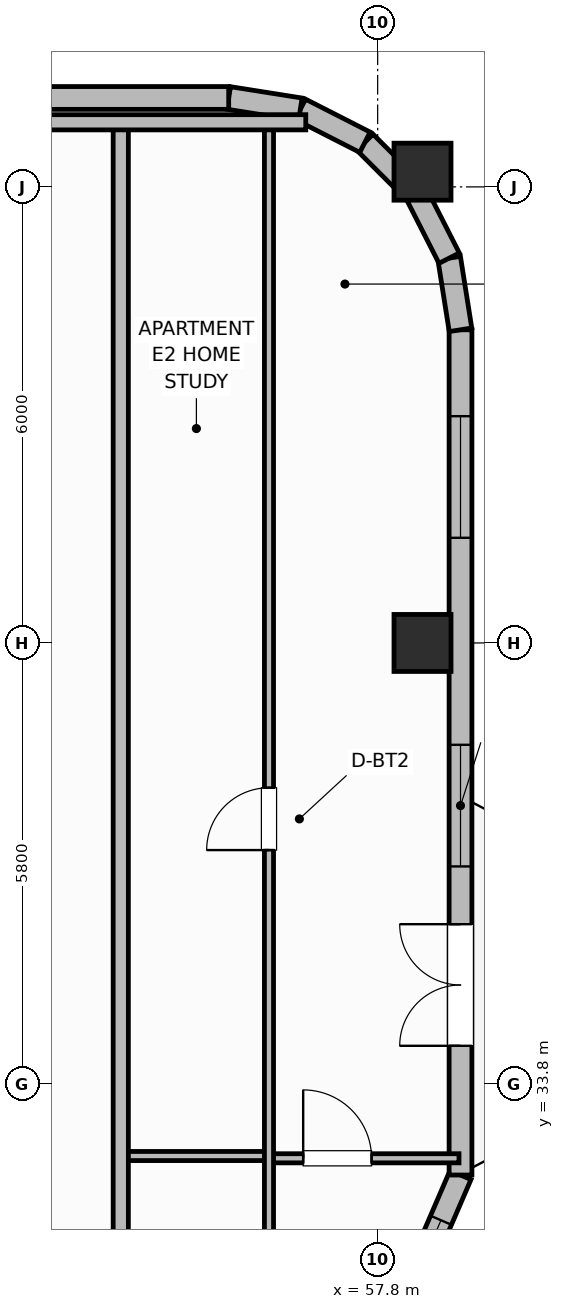
"""IFC4 building model, lengths in metres.
Left out: names, types, materials, properties, quantities, classifications, styles, units other than length and angle.
Written with IfcOpenShell. Run it as: python <this file> out.ifc"""

import sys

from ifc_helpers import new_model, si_unit, direction, frame, frame_2d, origin, origin_2d, place, context, subcontext, project, spatial, rectangle, extrude, element, fill, save


model = new_model("IFC4")
c1 = context("Model", 3, precision=1e-05, world=origin(), true_north=direction((0.0, 1.0)))
c2 = subcontext(c1, "Body", "Model", "MODEL_VIEW")
j1 = project(units=[si_unit("LENGTHUNIT", "METRE"), si_unit("PLANEANGLEUNIT", "RADIAN")], contexts=[c1])
p1 = place(None, origin())
s1 = spatial("IfcSite", under=j1, at=p1, CompositionType="ELEMENT")
p2 = place(p1, origin())
s2 = spatial("IfcBuilding", under=s1, at=p2, CompositionType="ELEMENT")
p3 = place(p2, frame((0.0, 0.0, 293.5)))
s3 = spatial("IfcBuildingStorey", under=s2, at=p3, CompositionType="ELEMENT", Elevation=293.5)
for number, where, z_axis, x_axis in (
    (1, (58.39, 39.6, 0.0), (0.0, 0.0, 1.0), (1.0, 0.0, 0.0)),
    (2, (58.39, 45.8, 0.0), (0.0, 0.0, 1.0), (1.0, 0.0, 0.0)),
):
    element("IfcColumn", number, at=place(p3, frame(where, z_axis=z_axis, x_axis=x_axis)), inside=s3, PredefinedType="COLUMN", context=c2, shape_type="SweptSolid", body=[
        extrude(rectangle(XDim=0.75, YDim=0.75, at=origin_2d()), origin(), (0.0, 0.0, 1.0), 3.7),
    ])
p4 = place(p3, frame((57.94, 30.4, 0.0), z_axis=(0.0, 0.0, 1.0), x_axis=(0.396389181543, 0.918082576218, 0.0)))
e3 = element("IfcWall", 3, at=p4, inside=s3, PredefinedType="SOLIDWALL", context=c2, shape_type="SweptSolid", body=[
    extrude(rectangle(XDim=2.396, YDim=0.3, at=frame_2d((1.198, 0.0))), origin(), (0.0, 0.0, 1.0), 2.71),
])
p5 = place(p4, frame((0.648, 0.0, 0.9)))
e4 = element("IfcOpeningElement", 4, at=p5, cuts=e3, PredefinedType="OPENING", context=c2, shape_type="SweptSolid", body=[
    extrude(rectangle(XDim=1.1, YDim=1.65, at=frame_2d((0.55, 0.825))), frame((0.0, 0.16, 0.0), z_axis=(0.0, -1.0, 0.0), x_axis=(1.0, 0.0, 0.0)), (0.0, 0.0, 1.0), 0.32),
])
p6 = place(p3, frame((58.89, 32.6, 0.0), z_axis=(0.0, 0.0, 1.0), x_axis=(0.0, 1.0, 0.0)))
e5 = element("IfcWall", 5, at=p6, inside=s3, PredefinedType="SOLIDWALL", context=c2, shape_type="SweptSolid", body=[
    extrude(rectangle(XDim=11.12, YDim=0.3, at=frame_2d((5.56, 0.0))), origin(), (0.0, 0.0, 1.0), 2.71),
])
p7 = place(p6, frame((1.7, 0.0, 0.0)))
e6 = element("IfcOpeningElement", 6, at=p7, cuts=e5, PredefinedType="OPENING", context=c2, shape_type="SweptSolid", body=[
    extrude(rectangle(XDim=1.6, YDim=2.1, at=frame_2d((0.8, 1.05))), frame((0.0, 0.16, 0.0), z_axis=(0.0, -1.0, 0.0), x_axis=(1.0, 0.0, 0.0)), (0.0, 0.0, 1.0), 0.32),
])
p8 = place(p6, frame((4.06, 0.0, 0.69)))
e7 = element("IfcOpeningElement", 7, at=p8, cuts=e5, PredefinedType="OPENING", context=c2, shape_type="SweptSolid", body=[
    extrude(rectangle(XDim=1.6, YDim=1.9, at=frame_2d((0.8, 0.95))), frame((0.0, 0.16, 0.0), z_axis=(0.0, -1.0, 0.0), x_axis=(1.0, 0.0, 0.0)), (0.0, 0.0, 1.0), 0.32),
])
p9 = place(p6, frame((8.383, 0.0, 0.69)))
e8 = element("IfcOpeningElement", 8, at=p9, cuts=e5, PredefinedType="OPENING", context=c2, shape_type="SweptSolid", body=[
    extrude(rectangle(XDim=1.6, YDim=1.9, at=frame_2d((0.8, 0.95))), frame((0.0, 0.16, 0.0), z_axis=(0.0, -1.0, 0.0), x_axis=(1.0, 0.0, 0.0)), (0.0, 0.0, 1.0), 0.32),
])
p10 = place(p3, frame((58.89, 43.72, 0.0), z_axis=(0.0, 0.0, 1.0), x_axis=(-0.156304114255, 0.987708977314, 0.0)))
e9 = element("IfcWall", 9, at=p10, inside=s3, PredefinedType="SOLIDWALL", context=c2, shape_type="SweptSolid", body=[
    extrude(rectangle(XDim=0.954, YDim=0.3, at=frame_2d((0.477, 0.0))), origin(), (0.0, 0.0, 1.0), 2.71),
])
p11 = place(p3, frame((58.741, 44.663, 0.0), z_axis=(0.0, 0.0, 1.0), x_axis=(-0.45395644796, 0.891023873617, 0.0)))
e10 = element("IfcWall", 10, at=p11, inside=s3, PredefinedType="SOLIDWALL", context=c2, shape_type="SweptSolid", body=[
    extrude(rectangle(XDim=0.954, YDim=0.3, at=frame_2d((0.477, 0.0))), origin(), (0.0, 0.0, 1.0), 2.71),
])
for number, where, z_axis, x_axis in (
    (11, (58.308, 45.513, 0.0), (0.0, 0.0, 1.0), (-0.707, 0.707, 0.0)),
    (12, (57.633, 46.188, 0.0), (0.0, 0.0, 1.0), (-0.891, 0.454, 0.0)),
):
    element("IfcWall", number, at=place(p3, frame(where, z_axis=z_axis, x_axis=x_axis)), inside=s3, PredefinedType="SOLIDWALL", context=c2, shape_type="SweptSolid", body=[
        extrude(rectangle(XDim=0.954, YDim=0.3, at=frame_2d((0.477, 0.0))), origin(), (0.0, 0.0, 1.0), 2.71),
    ])
p12 = place(p3, frame((56.782, 46.621, 0.0), z_axis=(0.0, 0.0, 1.0), x_axis=(-0.987663181641, 0.156593229835, 0.0)))
e13 = element("IfcWall", 13, at=p12, inside=s3, PredefinedType="SOLIDWALL", context=c2, shape_type="SweptSolid", body=[
    extrude(rectangle(XDim=0.954, YDim=0.3, at=frame_2d((0.477, 0.0))), origin(), (0.0, 0.0, 1.0), 2.71),
])
p13 = place(p3, frame((55.84, 46.77, 0.0), z_axis=(0.0, 0.0, 1.0), x_axis=(-1.0, 0.0, 0.0)))
e14 = element("IfcWall", 14, at=p13, inside=s3, PredefinedType="SOLIDWALL", context=c2, shape_type="SweptSolid", body=[
    extrude(rectangle(XDim=4.45, YDim=0.3, at=frame_2d((2.225, 0.0))), origin(), (0.0, 0.0, 1.0), 2.71),
])
p14 = place(p3, frame((54.42, 32.85, 0.0), z_axis=(0.0, 0.0, 1.0), x_axis=(1.0, 0.0, 0.0)))
e15 = element("IfcWall", 15, at=p14, inside=s3, PredefinedType="PARTITIONING", context=c2, shape_type="SweptSolid", body=[
    extrude(rectangle(XDim=1.95, YDim=0.12, at=frame_2d((0.975, 0.0))), origin(), (0.0, 0.0, 1.0), 2.54),
])
p15 = place(p3, frame((56.37, 32.82, 0.0), z_axis=(0.0, 0.0, 1.0), x_axis=(1.0, 0.0, 0.0)))
e16 = element("IfcWall", 16, at=p15, inside=s3, PredefinedType="PARTITIONING", context=c2, shape_type="SweptSolid", body=[
    extrude(rectangle(XDim=2.5, YDim=0.12, at=frame_2d((1.25, 0.0))), origin(), (0.0, 0.0, 1.0), 2.54),
])
p16 = place(p15, frame((0.45, 0.0, 0.0)))
e17 = element("IfcOpeningElement", 17, at=p16, cuts=e16, PredefinedType="OPENING", context=c2, shape_type="SweptSolid", body=[
    extrude(rectangle(XDim=0.9, YDim=2.1, at=frame_2d((0.45, 1.05))), frame((0.0, 0.07, 0.0), z_axis=(0.0, -1.0, 0.0), x_axis=(1.0, 0.0, 0.0)), (0.0, 0.0, 1.0), 0.14),
])
p17 = place(p3, frame((56.37, 23.69, 0.0), z_axis=(0.0, 0.0, 1.0), x_axis=(0.0, 1.0, 0.0)))
e18 = element("IfcWall", 18, at=p17, inside=s3, PredefinedType="PARTITIONING", context=c2, shape_type="SweptSolid", body=[
    extrude(rectangle(XDim=22.72, YDim=0.12, at=frame_2d((11.36, 0.0))), origin(), (0.0, 0.0, 1.0), 2.54),
])
p18 = place(p17, frame((0.41, 0.0, 0.0)))
e19 = element("IfcOpeningElement", 19, at=p18, cuts=e18, PredefinedType="OPENING", context=c2, shape_type="SweptSolid", body=[
    extrude(rectangle(XDim=0.9, YDim=2.1, at=frame_2d((0.45, 1.05))), frame((0.0, 0.07, 0.0), z_axis=(0.0, -1.0, 0.0), x_axis=(1.0, 0.0, 0.0)), (0.0, 0.0, 1.0), 0.14),
])
p19 = place(p17, frame((13.185, 0.0, 0.0)))
e20 = element("IfcOpeningElement", 20, at=p19, cuts=e18, PredefinedType="OPENING", context=c2, shape_type="SweptSolid", body=[
    extrude(rectangle(XDim=0.82, YDim=2.08, at=frame_2d((0.41, 1.04))), frame((0.0, 0.07, 0.0), z_axis=(0.0, -1.0, 0.0), x_axis=(1.0, 0.0, 0.0)), (0.0, 0.0, 1.0), 0.14),
])
p20 = place(p3, frame((54.42, 9.95, 0.0), z_axis=(0.0, 0.0, 1.0), x_axis=(0.0, 1.0, 0.0)))
e21 = element("IfcWall", 21, at=p20, inside=s3, PredefinedType="PARTITIONING", context=c2, shape_type="SweptSolid", body=[
    extrude(rectangle(XDim=36.5, YDim=0.2, at=frame_2d((18.25, 0.0))), origin(), (0.0, 0.0, 1.0), 2.54),
])
p21 = place(p20, frame((3.25, 0.0, 0.0)))
e22 = element("IfcOpeningElement", 22, at=p21, cuts=e21, PredefinedType="OPENING", context=c2, shape_type="SweptSolid", body=[
    extrude(rectangle(XDim=1.0, YDim=2.15, at=frame_2d((0.5, 1.075))), frame((0.0, 0.11, 0.0), z_axis=(0.0, -1.0, 0.0), x_axis=(1.0, 0.0, 0.0)), (0.0, 0.0, 1.0), 0.22),
])
p22 = place(p20, frame((14.25, 0.0, 0.0)))
e23 = element("IfcOpeningElement", 23, at=p22, cuts=e21, PredefinedType="OPENING", context=c2, shape_type="SweptSolid", body=[
    extrude(rectangle(XDim=1.0, YDim=2.15, at=frame_2d((0.5, 1.075))), frame((0.0, 0.11, 0.0), z_axis=(0.0, -1.0, 0.0), x_axis=(1.0, 0.0, 0.0)), (0.0, 0.0, 1.0), 0.22),
])
p23 = place(p3, frame((53.1, 46.45, 0.0), z_axis=(0.0, 0.0, 1.0), x_axis=(1.0, 0.0, 0.0)))
e24 = element("IfcWall", 24, at=p23, inside=s3, PredefinedType="PARTITIONING", context=c2, shape_type="SweptSolid", body=[
    extrude(rectangle(XDim=3.754, YDim=0.2, at=frame_2d((1.877, 0.0))), origin(), (0.0, 0.0, 1.0), 2.54),
])
p24 = place(p5, origin())
e25 = element("IfcWindow", 25, at=p24, inside=s3, PartitioningType="SINGLE_PANEL", PredefinedType="WINDOW", context=c2, shape_type="SweptSolid", body=[
    extrude(rectangle(XDim=1.1, YDim=1.65, at=frame_2d((0.55, 0.825))), frame((0.0, 0.03, 0.0), z_axis=(0.0, -1.0, 0.0), x_axis=(1.0, 0.0, 0.0)), (0.0, 0.0, 1.0), 0.06),
])
fill(e4, e25)
p25 = place(p7, origin())
e26 = element("IfcDoor", 26, at=p25, inside=s3, OperationType="DOUBLE_DOOR_SINGLE_SWING", PredefinedType="DOOR", context=c2, shape_type="SweptSolid", body=[
    extrude(rectangle(XDim=1.6, YDim=2.1, at=frame_2d((0.8, 1.05))), frame((0.0, 0.025, 0.0), z_axis=(0.0, -1.0, 0.0), x_axis=(1.0, 0.0, 0.0)), (0.0, 0.0, 1.0), 0.05),
])
fill(e6, e26)
p26 = place(p8, origin())
e27 = element("IfcWindow", 27, at=p26, inside=s3, PartitioningType="SINGLE_PANEL", PredefinedType="WINDOW", context=c2, shape_type="SweptSolid", body=[
    extrude(rectangle(XDim=1.6, YDim=1.9, at=frame_2d((0.8, 0.95))), frame((0.0, 0.03, 0.0), z_axis=(0.0, -1.0, 0.0), x_axis=(1.0, 0.0, 0.0)), (0.0, 0.0, 1.0), 0.06),
])
fill(e7, e27)
p27 = place(p9, origin())
e28 = element("IfcWindow", 28, at=p27, inside=s3, PartitioningType="SINGLE_PANEL", PredefinedType="WINDOW", context=c2, shape_type="SweptSolid", body=[
    extrude(rectangle(XDim=1.6, YDim=1.9, at=frame_2d((0.8, 0.95))), frame((0.0, 0.03, 0.0), z_axis=(0.0, -1.0, 0.0), x_axis=(1.0, 0.0, 0.0)), (0.0, 0.0, 1.0), 0.06),
])
fill(e8, e28)
p28 = place(p16, origin())
e29 = element("IfcDoor", 29, at=p28, inside=s3, OperationType="SINGLE_SWING_LEFT", PredefinedType="DOOR", context=c2, shape_type="SweptSolid", body=[
    extrude(rectangle(XDim=0.9, YDim=2.1, at=frame_2d((0.45, 1.05))), frame((0.0, 0.025, 0.0), z_axis=(0.0, -1.0, 0.0), x_axis=(1.0, 0.0, 0.0)), (0.0, 0.0, 1.0), 0.05),
])
fill(e17, e29)
p29 = place(p19, origin())
e30 = element("IfcDoor", 30, at=p29, inside=s3, OperationType="SINGLE_SWING_LEFT", PredefinedType="DOOR", context=c2, shape_type="SweptSolid", body=[
    extrude(rectangle(XDim=0.82, YDim=2.08, at=frame_2d((0.41, 1.04))), frame((0.0, 0.025, 0.0), z_axis=(0.0, -1.0, 0.0), x_axis=(1.0, 0.0, 0.0)), (0.0, 0.0, 1.0), 0.05),
])
fill(e20, e30)
save(model, sys.argv[1])
